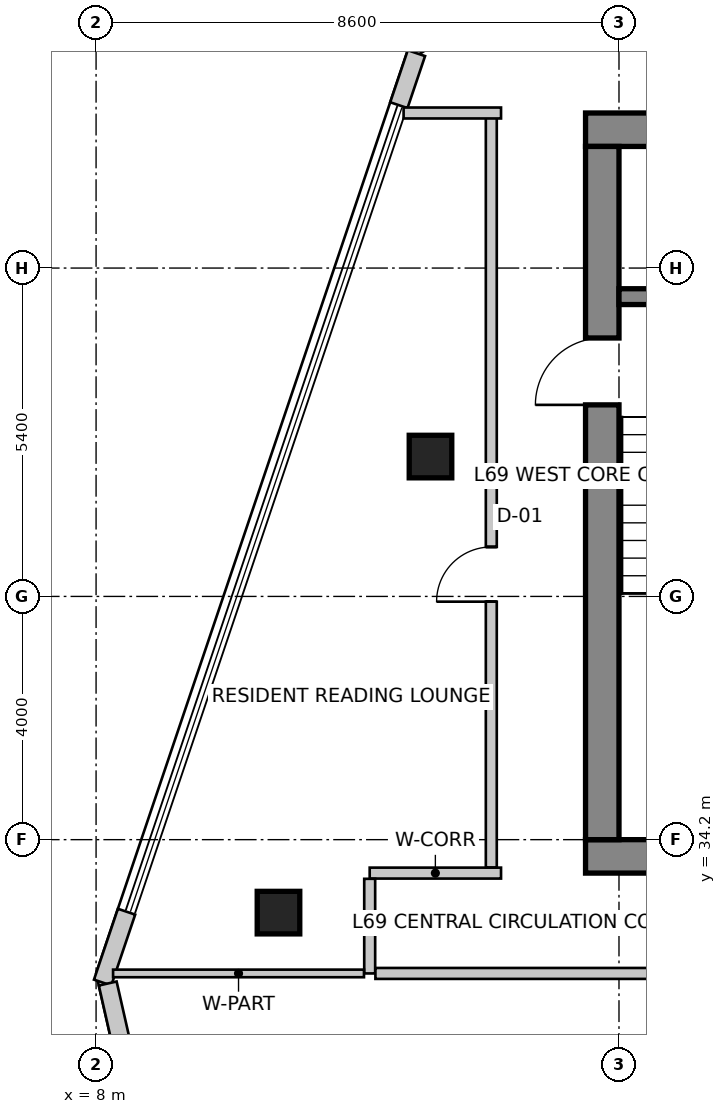
"""IFC4 building model, lengths in metres.
Left out: names, types, materials, properties, quantities, classifications, styles, units other than length and angle.
Written with IfcOpenShell. Run it as: python <this file> out.ifc"""

import sys

from ifc_helpers import new_model, si_unit, direction, frame, frame_2d, origin, origin_2d, place, context, subcontext, project, spatial, rectangle, extrude, source, transform, mapped, element, fill, save


model = new_model("IFC4")
c1 = context("Model", 3, precision=1e-05, world=origin(), true_north=direction((0.0, 1.0)))
c2 = subcontext(c1, "Body", "Model", "MODEL_VIEW")
j1 = project(units=[si_unit("LENGTHUNIT", "METRE"), si_unit("PLANEANGLEUNIT", "RADIAN")], contexts=[c1])
p1 = place(None, origin())
s1 = spatial("IfcSite", under=j1, at=p1, CompositionType="ELEMENT")
p2 = place(p1, origin())
s2 = spatial("IfcBuilding", under=s1, at=p2, CompositionType="ELEMENT")
p3 = place(p2, frame((0.0, 0.0, 270.9)))
s3 = spatial("IfcBuildingStorey", under=s2, at=p3, CompositionType="ELEMENT", Elevation=270.9)
p4 = place(p3, frame((16.05, 45.875, 0.0), z_axis=(0.0, 0.0, 1.0), x_axis=(1.0, 0.0, 0.0)))
e1 = element("IfcWall", 1, at=p4, inside=s3, PredefinedType="SHEAR", context=c2, shape_type="SweptSolid", body=[
    extrude(rectangle(XDim=15.5, YDim=0.55, at=frame_2d((7.75, 0.0))), origin(), (0.0, 0.0, 1.0), 3.6),
])
p5 = place(p3, frame((16.05, 33.925, 0.0), z_axis=(0.0, 0.0, 1.0), x_axis=(1.0, 0.0, 0.0)))
e2 = element("IfcWall", 2, at=p5, inside=s3, PredefinedType="SHEAR", context=c2, shape_type="SweptSolid", body=[
    extrude(rectangle(XDim=15.5, YDim=0.55, at=frame_2d((7.75, 0.0))), origin(), (0.0, 0.0, 1.0), 3.6),
])
m1 = source(origin(), c2, "Body", "SweptSolid", [
    extrude(rectangle(XDim=1.1, YDim=2.15, at=frame_2d((0.55, 1.075))), frame((0.0, 0.285, 0.0), z_axis=(0.0, -1.0, 0.0), x_axis=(1.0, 0.0, 0.0)), (0.0, 0.0, 1.0), 0.57),
])
p6 = place(p5, frame((9.98, 0.0, 0.0)))
e3 = element("IfcOpeningElement", 3, at=p6, cuts=e2, PredefinedType="OPENING", context=c2, shape_type="MappedRepresentation", body=[
    mapped(m1, transform((0.0, 0.0, 0.0), scale=1.0)),
])
p7 = place(p3, frame((16.325, 34.2, 0.0), z_axis=(0.0, 0.0, 1.0), x_axis=(0.0, 1.0, 0.0)))
e4 = element("IfcWall", 4, at=p7, inside=s3, PredefinedType="SHEAR", context=c2, shape_type="SweptSolid", body=[
    extrude(rectangle(XDim=11.4, YDim=0.55, at=frame_2d((5.7, 0.0))), origin(), (0.0, 0.0, 1.0), 3.6),
])
p8 = place(p7, frame((7.15, 0.0, 0.0)))
e5 = element("IfcOpeningElement", 5, at=p8, cuts=e4, PredefinedType="OPENING", context=c2, shape_type="MappedRepresentation", body=[
    mapped(m1, transform((0.0, 0.0, 0.0), scale=1.0)),
])
p9 = place(p3, frame((16.6, 43.13, 0.0), z_axis=(0.0, 0.0, 1.0), x_axis=(1.0, 0.0, 0.0)))
e6 = element("IfcWall", 6, at=p9, inside=s3, PredefinedType="SHEAR", context=c2, shape_type="SweptSolid", body=[
    extrude(rectangle(XDim=3.5, YDim=0.26, at=frame_2d((1.75, 0.0))), origin(), (0.0, 0.0, 1.0), 3.6),
])
m2 = source(origin(), c2, "Body", "SweptSolid", [
    extrude(rectangle(XDim=0.7, YDim=0.7, at=origin_2d()), origin(), (0.0, 0.0, 1.0), 3.6),
])
for number, where, z_axis, x_axis in (
    (7, (11.0, 33.0, 0.0), (0.0, 0.0, 1.0), (1.0, 0.0, 0.0)),
    (8, (13.5, 40.5, 0.0), (0.0, 0.0, 1.0), (1.0, 0.0, 0.0)),
):
    element("IfcColumn", number, at=place(p3, frame(where, z_axis=z_axis, x_axis=x_axis)), inside=s3, PredefinedType="COLUMN", context=c2, shape_type="MappedRepresentation", body=[
        mapped(m2, transform((0.0, 0.0, 0.0), scale=1.0)),
    ])
p10 = place(p3, frame((21.874, 52.742, 0.0), z_axis=(0.0, 0.0, 1.0), x_axis=(-0.84365659959, -0.536883173482, 0.0)))
e9 = element("IfcWall", 9, at=p10, inside=s3, PredefinedType="SOLIDWALL", context=c2, shape_type="SweptSolid", body=[
    extrude(rectangle(XDim=10.283, YDim=0.3, at=frame_2d((5.142, 0.0))), origin(), (0.0, 0.0, 1.0), 3.35),
])
m3 = source(origin(), c2, "Body", "SweptSolid", [
    extrude(rectangle(XDim=2.4, YDim=2.2, at=frame_2d((1.2, 1.1))), frame((0.0, 0.16, 0.0), z_axis=(0.0, -1.0, 0.0), x_axis=(1.0, 0.0, 0.0)), (0.0, 0.0, 1.0), 0.32),
])
p11 = place(p10, frame((1.26, 0.0, 0.85)))
e10 = element("IfcOpeningElement", 10, at=p11, cuts=e9, PredefinedType="OPENING", context=c2, shape_type="MappedRepresentation", body=[
    mapped(m3, transform((0.0, 0.0, 0.0), scale=1.0)),
])
m4 = source(origin(), c2, "Body", "SweptSolid", [
    extrude(rectangle(XDim=2.1, YDim=2.0, at=frame_2d((1.05, 1.0))), frame((0.0, 0.16, 0.0), z_axis=(0.0, -1.0, 0.0), x_axis=(1.0, 0.0, 0.0)), (0.0, 0.0, 1.0), 0.32),
])
p12 = place(p10, frame((5.69, 0.0, 0.85)))
e11 = element("IfcOpeningElement", 11, at=p12, cuts=e9, PredefinedType="OPENING", context=c2, shape_type="MappedRepresentation", body=[
    mapped(m4, transform((0.0, 0.0, 0.0), scale=1.0)),
])
p13 = place(p3, frame((13.269, 47.134, 0.0), z_axis=(0.0, 0.0, 1.0), x_axis=(-0.31995770778, -0.947431826166, 0.0)))
e12 = element("IfcWall", 12, at=p13, inside=s3, PredefinedType="SOLIDWALL", context=c2, shape_type="SweptSolid", body=[
    extrude(rectangle(XDim=0.903, YDim=0.3, at=frame_2d((0.451, 0.0))), origin(), (0.0, 0.0, 1.0), 3.35),
])
p14 = place(p3, frame((8.501, 33.015, 0.0), z_axis=(0.0, 0.0, 1.0), x_axis=(-0.319916718913, -0.94744566755, 0.0)))
e13 = element("IfcWall", 13, at=p14, inside=s3, PredefinedType="SOLIDWALL", context=c2, shape_type="SweptSolid", body=[
    extrude(rectangle(XDim=1.23, YDim=0.3, at=frame_2d((0.615, 0.0))), origin(), (0.0, 0.0, 1.0), 3.35),
])
p15 = place(p3, frame((8.191, 31.834, 0.0), z_axis=(0.0, 0.0, 1.0), x_axis=(0.221636032737, -0.975129462683, 0.0)))
e14 = element("IfcWall", 14, at=p15, inside=s3, PredefinedType="SOLIDWALL", context=c2, shape_type="SweptSolid", body=[
    extrude(rectangle(XDim=10.602, YDim=0.3, at=frame_2d((5.301, 0.0))), origin(), (0.0, 0.0, 1.0), 3.35),
])
p16 = place(p15, frame((2.59, 0.0, 0.85)))
e15 = element("IfcOpeningElement", 15, at=p16, cuts=e14, PredefinedType="OPENING", context=c2, shape_type="MappedRepresentation", body=[
    mapped(m3, transform((0.0, 0.0, 0.0), scale=1.0)),
])
p17 = place(p15, frame((7.791, 0.0, 0.85)))
e16 = element("IfcOpeningElement", 16, at=p17, cuts=e14, PredefinedType="OPENING", context=c2, shape_type="MappedRepresentation", body=[
    mapped(m3, transform((0.0, 0.0, 0.0), scale=1.0)),
])
p18 = place(p3, frame((12.5, 33.65, 0.0), z_axis=(0.0, 0.0, 1.0), x_axis=(1.0, 0.0, 0.0)))
e17 = element("IfcWall", 17, at=p18, inside=s3, PredefinedType="PARTITIONING", context=c2, shape_type="SweptSolid", body=[
    extrude(rectangle(XDim=2.16, YDim=0.18, at=frame_2d((1.08, 0.0))), origin(), (0.0, 0.0, 1.0), 3.35),
])
p19 = place(p3, frame((12.5, 32.0, 0.0), z_axis=(0.0, 0.0, 1.0), x_axis=(0.0, 1.0, 0.0)))
e18 = element("IfcWall", 18, at=p19, inside=s3, PredefinedType="PARTITIONING", context=c2, shape_type="SweptSolid", body=[
    extrude(rectangle(XDim=1.556, YDim=0.18, at=frame_2d((0.778, 0.0))), origin(), (0.0, 0.0, 1.0), 2.935),
])
p20 = place(p3, frame((27.001, 32.0, 0.0), z_axis=(0.0, 0.0, 1.0), x_axis=(-1.0, 0.0, 0.0)))
e19 = element("IfcWall", 19, at=p20, inside=s3, PredefinedType="PARTITIONING", context=c2, shape_type="SweptSolid", body=[
    extrude(rectangle(XDim=14.407, YDim=0.18, at=frame_2d((7.204, 0.0))), origin(), (0.0, 0.0, 1.0), 2.935),
])
m5 = source(origin(), c2, "Body", "SweptSolid", [
    extrude(rectangle(XDim=1.4, YDim=2.15, at=frame_2d((0.7, 1.075))), frame((0.0, 0.1, 0.0), z_axis=(0.0, -1.0, 0.0), x_axis=(1.0, 0.0, 0.0)), (0.0, 0.0, 1.0), 0.2),
])
p21 = place(p20, frame((6.443, 0.0, 0.0)))
e20 = element("IfcOpeningElement", 20, at=p21, cuts=e19, PredefinedType="OPENING", context=c2, shape_type="MappedRepresentation", body=[
    mapped(m5, transform((0.0, 0.0, 0.0), scale=1.0)),
])
p22 = place(p3, frame((14.5, 33.744, 0.0), z_axis=(0.0, 0.0, 1.0), x_axis=(0.0, 1.0, 0.0)))
e21 = element("IfcWall", 21, at=p22, inside=s3, PredefinedType="PARTITIONING", context=c2, shape_type="SweptSolid", body=[
    extrude(rectangle(XDim=12.406, YDim=0.18, at=frame_2d((6.203, 0.0))), origin(), (0.0, 0.0, 1.0), 3.35),
])
m6 = source(origin(), c2, "Body", "SweptSolid", [
    extrude(rectangle(XDim=0.9, YDim=2.15, at=frame_2d((0.45, 1.075))), frame((0.0, 0.1, 0.0), z_axis=(0.0, -1.0, 0.0), x_axis=(1.0, 0.0, 0.0)), (0.0, 0.0, 1.0), 0.2),
])
p23 = place(p22, frame((4.37, 0.0, 0.0)))
e22 = element("IfcOpeningElement", 22, at=p23, cuts=e21, PredefinedType="OPENING", context=c2, shape_type="MappedRepresentation", body=[
    mapped(m6, transform((0.0, 0.0, 0.0), scale=1.0)),
])
p24 = place(p3, frame((14.66, 46.15, 0.0), z_axis=(0.0, 0.0, 1.0), x_axis=(-1.0, 0.0, 0.0)))
e23 = element("IfcWall", 23, at=p24, inside=s3, PredefinedType="PARTITIONING", context=c2, shape_type="SweptSolid", body=[
    extrude(rectangle(XDim=1.602, YDim=0.18, at=frame_2d((0.801, 0.0))), origin(), (0.0, 0.0, 1.0), 3.35),
])
p25 = place(p3, frame((12.406, 32.0, 0.0), z_axis=(0.0, 0.0, 1.0), x_axis=(-1.0, 0.0, 0.0)))
e24 = element("IfcWall", 24, at=p25, inside=s3, PredefinedType="PARTITIONING", context=c2, shape_type="SweptSolid", body=[
    extrude(rectangle(XDim=4.126, YDim=0.125, at=frame_2d((2.063, 0.0))), origin(), (0.0, 0.0, 1.0), 2.642),
])
m7 = source(origin(), c2, "Body", "SweptSolid", [
    extrude(rectangle(XDim=1.1, YDim=2.15, at=frame_2d((0.55, 1.075))), frame((0.0, 0.025, 0.0), z_axis=(0.0, -1.0, 0.0), x_axis=(1.0, 0.0, 0.0)), (0.0, 0.0, 1.0), 0.05),
])
p26 = place(p8, origin())
e25 = element("IfcDoor", 25, at=p26, inside=s3, OperationType="SINGLE_SWING_LEFT", PredefinedType="DOOR", context=c2, shape_type="MappedRepresentation", body=[
    mapped(m7, transform((0.0, 0.0, 0.0), scale=1.0)),
])
fill(e5, e25)
m8 = source(origin(), c2, "Body", "SweptSolid", [
    extrude(rectangle(XDim=0.9, YDim=2.15, at=frame_2d((0.45, 1.075))), frame((0.0, 0.025, 0.0), z_axis=(0.0, -1.0, 0.0), x_axis=(1.0, 0.0, 0.0)), (0.0, 0.0, 1.0), 0.05),
])
p27 = place(p23, origin())
e26 = element("IfcDoor", 26, at=p27, inside=s3, OperationType="SINGLE_SWING_LEFT", PredefinedType="DOOR", context=c2, shape_type="MappedRepresentation", body=[
    mapped(m8, transform((0.0, 0.0, 0.0), scale=1.0)),
])
fill(e22, e26)
save(model, sys.argv[1])
